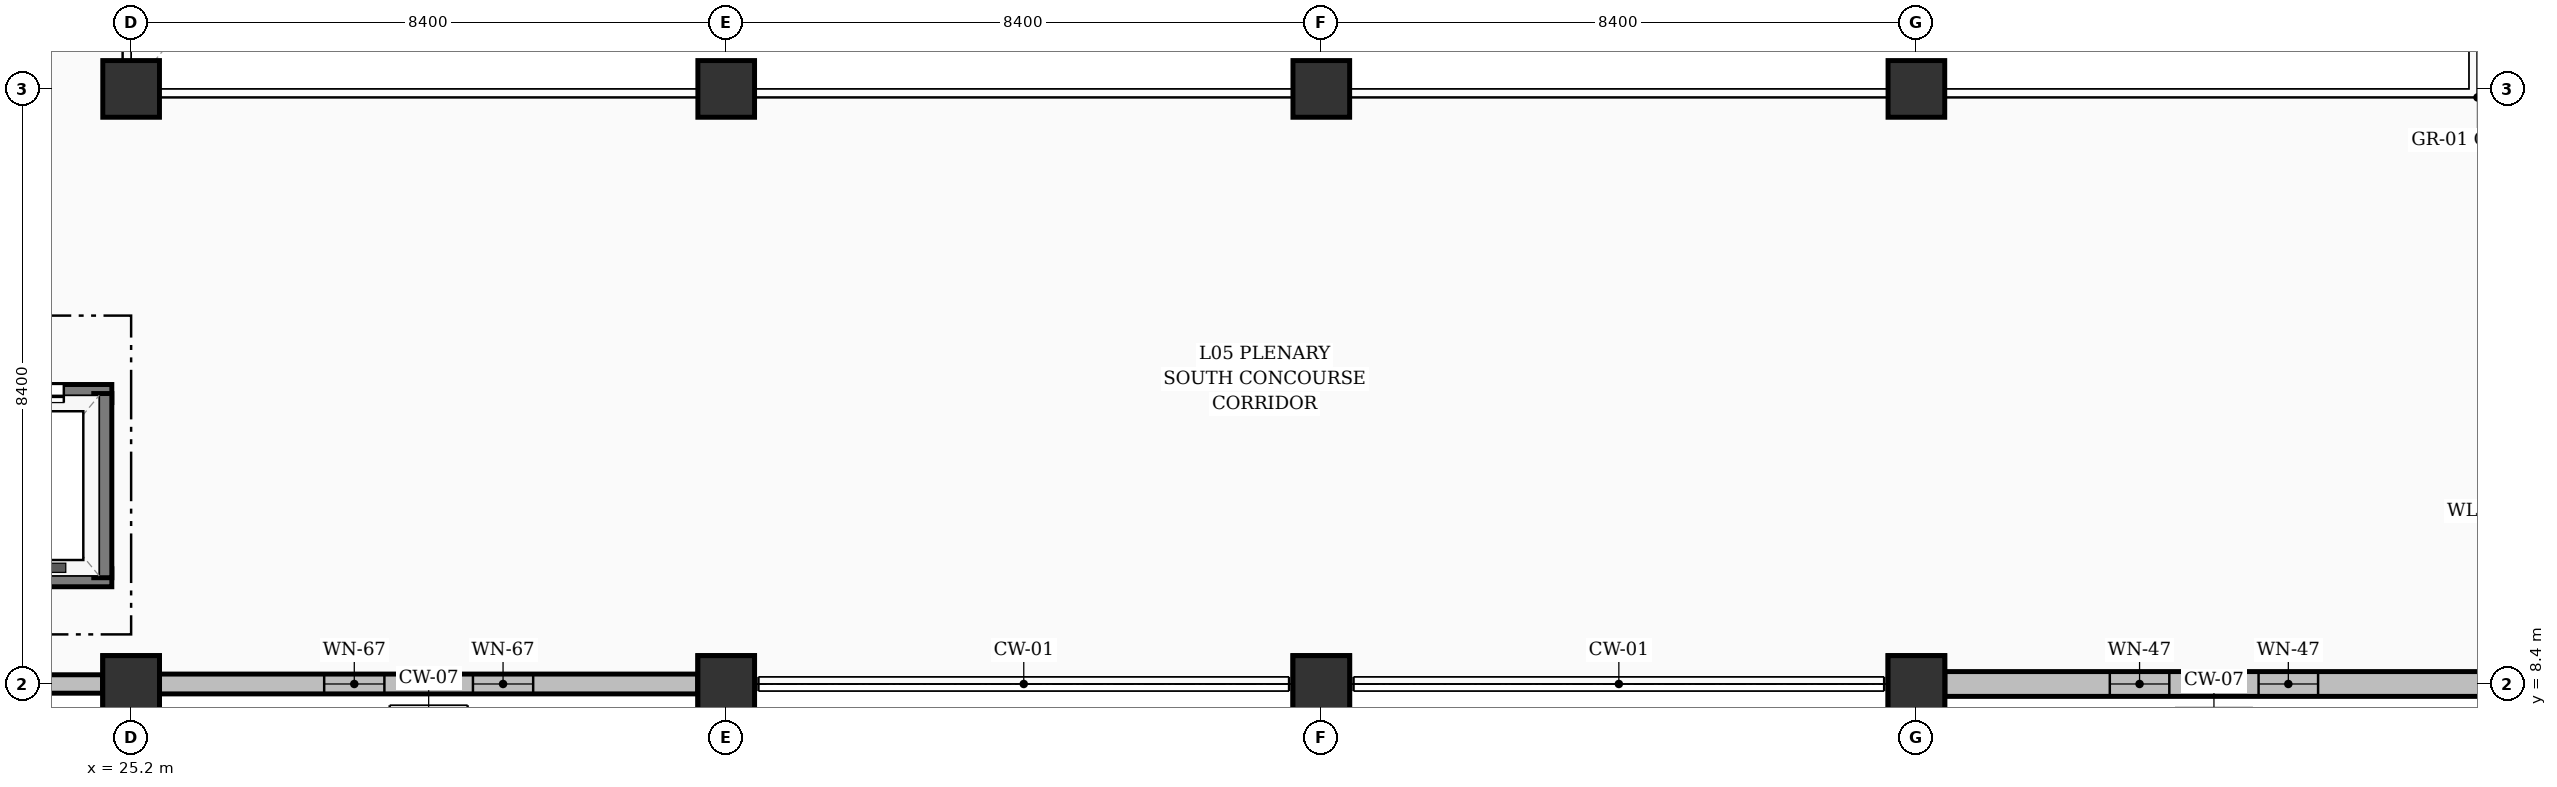
"""IFC4 building model, lengths in metres.
Left out: names, types, materials, properties, quantities, classifications, styles, units other than length and angle.
Written with IfcOpenShell. Run it as: python <this file> out.ifc"""

import sys

from ifc_helpers import new_model, si_unit, direction, frame, frame_2d, origin, origin_2d, place, context, subcontext, project, spatial, rectangle, extrude, element, fill, save


model = new_model("IFC4")
c1 = context("Model", 3, precision=1e-05, world=origin(), true_north=direction((0.0, 1.0)))
c2 = subcontext(c1, "Body", "Model", "MODEL_VIEW")
j1 = project(units=[si_unit("LENGTHUNIT", "METRE"), si_unit("PLANEANGLEUNIT", "RADIAN")], contexts=[c1])
p1 = place(None, origin())
s1 = spatial("IfcSite", under=j1, at=p1, CompositionType="ELEMENT")
p2 = place(p1, origin())
s2 = spatial("IfcBuilding", under=s1, at=p2, CompositionType="ELEMENT")
p3 = place(p2, frame((0.0, 0.0, 18.48)))
s3 = spatial("IfcBuildingStorey", under=s2, at=p3, CompositionType="ELEMENT", Elevation=18.48)
for number, where, z_axis, x_axis in (
    (1, (25.2, 8.4, 0.0), (0.0, 0.0, 1.0), (1.0, 0.0, 0.0)),
    (2, (25.2, 16.8, 0.0), (0.0, 0.0, 1.0), (1.0, 0.0, 0.0)),
    (3, (33.6, 8.4, 0.0), (0.0, 0.0, 1.0), (1.0, 0.0, 0.0)),
    (4, (33.6, 16.8, 0.0), (0.0, 0.0, 1.0), (1.0, 0.0, 0.0)),
    (5, (42.0, 8.4, 0.0), (0.0, 0.0, 1.0), (1.0, 0.0, 0.0)),
    (6, (42.0, 16.8, 0.0), (0.0, 0.0, 1.0), (1.0, 0.0, 0.0)),
    (7, (50.4, 8.4, 0.0), (0.0, 0.0, 1.0), (1.0, 0.0, 0.0)),
    (8, (50.4, 16.8, 0.0), (0.0, 0.0, 1.0), (1.0, 0.0, 0.0)),
):
    element("IfcColumn", number, at=place(p3, frame(where, z_axis=z_axis, x_axis=x_axis)), inside=s3, PredefinedType="COLUMN", context=c2, shape_type="SweptSolid", body=[
        extrude(rectangle(XDim=0.8, YDim=0.8, at=origin_2d()), origin(), (0.0, 0.0, 1.0), 3.36),
    ])
p4 = place(p3, frame((25.2, 8.4, 3.36), z_axis=(0.0, 0.0, 1.0), x_axis=(1.0, 0.0, 0.0)))
e9 = element("IfcColumn", 9, at=p4, inside=s3, PredefinedType="COLUMN", context=c2, shape_type="SweptSolid", body=[
    extrude(rectangle(XDim=0.8, YDim=0.8, at=origin_2d()), origin(), (0.0, 0.0, 1.0), 7.0),
])
p5 = place(p3, frame((33.6, 8.4, 3.36), z_axis=(0.0, 0.0, 1.0), x_axis=(1.0, 0.0, 0.0)))
e10 = element("IfcColumn", 10, at=p5, inside=s3, PredefinedType="COLUMN", context=c2, shape_type="SweptSolid", body=[
    extrude(rectangle(XDim=0.8, YDim=0.8, at=origin_2d()), origin(), (0.0, 0.0, 1.0), 6.555),
])
p6 = place(p3, frame((42.0, 8.4, 3.36), z_axis=(0.0, 0.0, 1.0), x_axis=(1.0, 0.0, 0.0)))
e11 = element("IfcColumn", 11, at=p6, inside=s3, PredefinedType="COLUMN", context=c2, shape_type="SweptSolid", body=[
    extrude(rectangle(XDim=0.8, YDim=0.8, at=origin_2d()), origin(), (0.0, 0.0, 1.0), 7.0),
])
p7 = place(p3, frame((50.4, 8.4, 3.36), z_axis=(0.0, 0.0, 1.0), x_axis=(1.0, 0.0, 0.0)))
e12 = element("IfcColumn", 12, at=p7, inside=s3, PredefinedType="COLUMN", context=c2, shape_type="SweptSolid", body=[
    extrude(rectangle(XDim=0.8, YDim=0.8, at=origin_2d()), origin(), (0.0, 0.0, 1.0), 8.338),
])
p8 = place(p3, frame((17.201, 8.4, 0.0), z_axis=(0.0, 0.0, 1.0), x_axis=(1.0, 0.0, 0.0)))
e13 = element("IfcWall", 13, at=p8, inside=s3, PredefinedType="SOLIDWALL", context=c2, shape_type="SweptSolid", body=[
    extrude(rectangle(XDim=7.598, YDim=0.26, at=frame_2d((3.799, 0.0))), origin(), (0.0, 0.0, 1.0), 2.494),
])
p9 = place(p8, frame((2.259, 0.0, 0.3)))
e14 = element("IfcOpeningElement", 14, at=p9, cuts=e13, PredefinedType="OPENING", context=c2, shape_type="SweptSolid", body=[
    extrude(rectangle(XDim=0.98, YDim=1.75, at=frame_2d((0.49, 0.875))), frame((0.0, 0.14, 0.0), z_axis=(0.0, -1.0, 0.0), x_axis=(1.0, 0.0, 0.0)), (0.0, 0.0, 1.0), 0.28),
])
p10 = place(p8, frame((4.359, 0.0, 0.3)))
e15 = element("IfcOpeningElement", 15, at=p10, cuts=e13, PredefinedType="OPENING", context=c2, shape_type="SweptSolid", body=[
    extrude(rectangle(XDim=0.98, YDim=1.75, at=frame_2d((0.49, 0.875))), frame((0.0, 0.14, 0.0), z_axis=(0.0, -1.0, 0.0), x_axis=(1.0, 0.0, 0.0)), (0.0, 0.0, 1.0), 0.28),
])
p11 = place(p3, frame((25.601, 8.4, 0.0), z_axis=(0.0, 0.0, 1.0), x_axis=(1.0, 0.0, 0.0)))
e16 = element("IfcWall", 16, at=p11, inside=s3, PredefinedType="SOLIDWALL", context=c2, shape_type="SweptSolid", body=[
    extrude(rectangle(XDim=7.598, YDim=0.28, at=frame_2d((3.799, 0.0))), origin(), (0.0, 0.0, 1.0), 2.494),
])
p12 = place(p11, frame((2.324, 0.0, 0.3)))
e17 = element("IfcOpeningElement", 17, at=p12, cuts=e16, PredefinedType="OPENING", context=c2, shape_type="SweptSolid", body=[
    extrude(rectangle(XDim=0.85, YDim=1.9, at=frame_2d((0.425, 0.95))), frame((0.0, 0.15, 0.0), z_axis=(0.0, -1.0, 0.0), x_axis=(1.0, 0.0, 0.0)), (0.0, 0.0, 1.0), 0.3),
])
p13 = place(p11, frame((4.424, 0.0, 0.3)))
e18 = element("IfcOpeningElement", 18, at=p13, cuts=e16, PredefinedType="OPENING", context=c2, shape_type="SweptSolid", body=[
    extrude(rectangle(XDim=0.85, YDim=1.9, at=frame_2d((0.425, 0.95))), frame((0.0, 0.15, 0.0), z_axis=(0.0, -1.0, 0.0), x_axis=(1.0, 0.0, 0.0)), (0.0, 0.0, 1.0), 0.3),
])
p14 = place(p3, frame((50.801, 8.4, 0.0), z_axis=(0.0, 0.0, 1.0), x_axis=(1.0, 0.0, 0.0)))
e19 = element("IfcWall", 19, at=p14, inside=s3, PredefinedType="SOLIDWALL", context=c2, shape_type="SweptSolid", body=[
    extrude(rectangle(XDim=7.598, YDim=0.35, at=frame_2d((3.799, 0.0))), origin(), (0.0, 0.0, 1.0), 2.494),
])
p15 = place(p14, frame((2.329, 0.0, 0.3)))
e20 = element("IfcOpeningElement", 20, at=p15, cuts=e19, PredefinedType="OPENING", context=c2, shape_type="SweptSolid", body=[
    extrude(rectangle(XDim=0.84, YDim=1.85, at=frame_2d((0.42, 0.925))), frame((0.0, 0.185, 0.0), z_axis=(0.0, -1.0, 0.0), x_axis=(1.0, 0.0, 0.0)), (0.0, 0.0, 1.0), 0.37),
])
p16 = place(p14, frame((4.429, 0.0, 0.3)))
e21 = element("IfcOpeningElement", 21, at=p16, cuts=e19, PredefinedType="OPENING", context=c2, shape_type="SweptSolid", body=[
    extrude(rectangle(XDim=0.84, YDim=1.85, at=frame_2d((0.42, 0.925))), frame((0.0, 0.185, 0.0), z_axis=(0.0, -1.0, 0.0), x_axis=(1.0, 0.0, 0.0)), (0.0, 0.0, 1.0), 0.37),
])
p17 = place(p3, frame((22.472, 9.9, 0.0), z_axis=(0.0, 0.0, 1.0), x_axis=(1.0, 0.0, 0.0)))
e22 = element("IfcWall", 22, at=p17, inside=s3, PredefinedType="SOLIDWALL", context=c2, shape_type="SweptSolid", body=[
    extrude(rectangle(XDim=2.455, YDim=0.255, at=frame_2d((1.228, 0.0))), origin(), (0.0, 0.0, 1.0), 3.125),
])
p18 = place(p3, frame((22.472, 12.5, 0.0), z_axis=(0.0, 0.0, 1.0), x_axis=(1.0, 0.0, 0.0)))
e23 = element("IfcWall", 23, at=p18, inside=s3, PredefinedType="SOLIDWALL", context=c2, shape_type="SweptSolid", body=[
    extrude(rectangle(XDim=2.455, YDim=0.255, at=frame_2d((1.228, 0.0))), origin(), (0.0, 0.0, 1.0), 3.125),
])
p19 = place(p18, frame((0.677, 0.0, 0.0)))
e24 = element("IfcOpeningElement", 24, at=p19, cuts=e23, PredefinedType="OPENING", context=c2, shape_type="SweptSolid", body=[
    extrude(rectangle(XDim=1.1, YDim=2.15, at=frame_2d((0.55, 1.075))), frame((0.0, 0.137, 0.0), z_axis=(0.0, -1.0, 0.0), x_axis=(1.0, 0.0, 0.0)), (0.0, 0.0, 1.0), 0.275),
])
p20 = place(p3, frame((24.8, 9.9, 0.0), z_axis=(0.0, 0.0, 1.0), x_axis=(0.0, 1.0, 0.0)))
e25 = element("IfcWall", 25, at=p20, inside=s3, PredefinedType="SOLIDWALL", context=c2, shape_type="SweptSolid", body=[
    extrude(rectangle(XDim=2.6, YDim=0.255, at=frame_2d((1.3, 0.0))), origin(), (0.0, 0.0, 1.0), 3.125),
])
p21 = place(p12, origin())
e26 = element("IfcWindow", 26, at=p21, inside=s3, PartitioningType="SINGLE_PANEL", PredefinedType="WINDOW", context=c2, shape_type="SweptSolid", body=[
    extrude(rectangle(XDim=0.85, YDim=1.9, at=frame_2d((0.425, 0.95))), frame((0.0, 0.03, 0.0), z_axis=(0.0, -1.0, 0.0), x_axis=(1.0, 0.0, 0.0)), (0.0, 0.0, 1.0), 0.06),
])
fill(e17, e26)
p22 = place(p13, origin())
e27 = element("IfcWindow", 27, at=p22, inside=s3, PartitioningType="SINGLE_PANEL", PredefinedType="WINDOW", context=c2, shape_type="SweptSolid", body=[
    extrude(rectangle(XDim=0.85, YDim=1.9, at=frame_2d((0.425, 0.95))), frame((0.0, 0.03, 0.0), z_axis=(0.0, -1.0, 0.0), x_axis=(1.0, 0.0, 0.0)), (0.0, 0.0, 1.0), 0.06),
])
fill(e18, e27)
p23 = place(p15, origin())
e28 = element("IfcWindow", 28, at=p23, inside=s3, PartitioningType="SINGLE_PANEL", PredefinedType="WINDOW", context=c2, shape_type="SweptSolid", body=[
    extrude(rectangle(XDim=0.84, YDim=1.85, at=frame_2d((0.42, 0.925))), frame((0.0, 0.03, 0.0), z_axis=(0.0, -1.0, 0.0), x_axis=(1.0, 0.0, 0.0)), (0.0, 0.0, 1.0), 0.06),
])
fill(e20, e28)
p24 = place(p16, origin())
e29 = element("IfcWindow", 29, at=p24, inside=s3, PartitioningType="SINGLE_PANEL", PredefinedType="WINDOW", context=c2, shape_type="SweptSolid", body=[
    extrude(rectangle(XDim=0.84, YDim=1.85, at=frame_2d((0.42, 0.925))), frame((0.0, 0.03, 0.0), z_axis=(0.0, -1.0, 0.0), x_axis=(1.0, 0.0, 0.0)), (0.0, 0.0, 1.0), 0.06),
])
fill(e21, e29)
p25 = place(p19, origin())
e30 = element("IfcDoor", 30, at=p25, inside=s3, OperationType="DOUBLE_DOOR_SLIDING", PredefinedType="DOOR", context=c2, shape_type="SweptSolid", body=[
    extrude(rectangle(XDim=1.1, YDim=2.15, at=frame_2d((0.55, 1.075))), frame((0.0, 0.025, 0.0), z_axis=(0.0, -1.0, 0.0), x_axis=(1.0, 0.0, 0.0)), (0.0, 0.0, 1.0), 0.05),
])
fill(e24, e30)
save(model, sys.argv[1])
